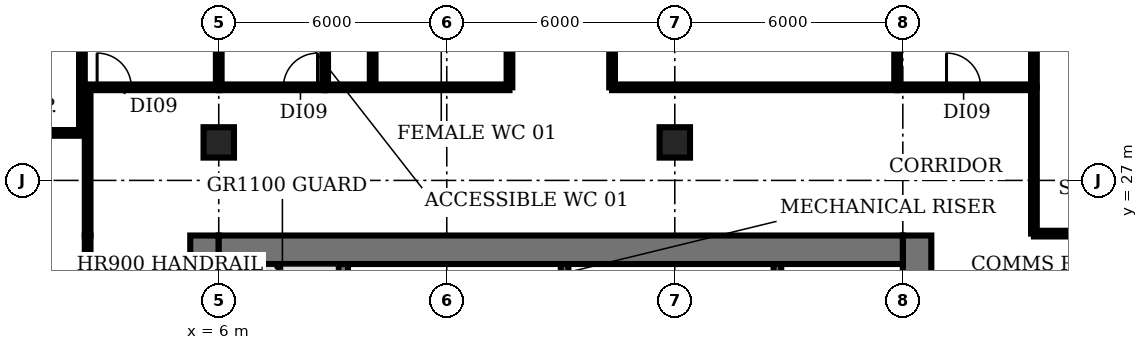
"""IFC4 building model, lengths in metres.
Left out: names, types, materials, properties, quantities, classifications, styles, units other than length and angle.
Written with IfcOpenShell. Run it as: python <this file> out.ifc"""

import sys

from ifc_helpers import new_model, si_unit, direction, frame, frame_2d, origin, origin_2d, place, context, subcontext, project, spatial, rectangle, extrude, element, fill, save


model = new_model("IFC4")
c1 = context("Model", 3, precision=1e-05, world=origin(), true_north=direction((0.0, 1.0)))
c2 = subcontext(c1, "Body", "Model", "MODEL_VIEW")
j1 = project(units=[si_unit("LENGTHUNIT", "METRE"), si_unit("PLANEANGLEUNIT", "RADIAN")], contexts=[c1])
p1 = place(None, origin())
s1 = spatial("IfcSite", under=j1, at=p1, CompositionType="ELEMENT")
p2 = place(p1, origin())
s2 = spatial("IfcBuilding", under=s1, at=p2, CompositionType="ELEMENT")
p3 = place(p2, frame((0.0, 0.0, 129.8)))
s3 = spatial("IfcBuildingStorey", under=s2, at=p3, CompositionType="ELEMENT", Elevation=129.8)
for number, where, z_axis, x_axis in (
    (1, (6.0, 28.0, 0.0), (0.0, 0.0, 1.0), (1.0, 0.0, 0.0)),
    (2, (18.0, 28.0, 0.0), (0.0, 0.0, 1.0), (1.0, 0.0, 0.0)),
):
    element("IfcColumn", number, at=place(p3, frame(where, z_axis=z_axis, x_axis=x_axis)), inside=s3, PredefinedType="COLUMN", context=c2, shape_type="SweptSolid", body=[
        extrude(rectangle(XDim=0.8, YDim=0.8, at=origin_2d()), origin(), (0.0, 0.0, 1.0), 3.85),
    ])
p4 = place(p3, frame((9.275, 18.375, 0.0), z_axis=(0.0, 0.0, 1.0), x_axis=(0.0, 1.0, 0.0)))
e3 = element("IfcWall", 3, at=p4, inside=s3, PredefinedType="SHEAR", context=c2, shape_type="SweptSolid", body=[
    extrude(rectangle(XDim=6.425, YDim=0.25, at=frame_2d((3.212, 0.0))), origin(), (0.0, 0.0, 1.0), 3.85),
])
for number, where, z_axis, x_axis in (
    (4, (15.1, 22.9, 0.0), (0.0, 0.0, 1.0), (0.0, 1.0, 0.0)),
    (5, (20.7, 22.9, 0.0), (0.0, 0.0, 1.0), (0.0, 1.0, 0.0)),
):
    element("IfcWall", number, at=place(p3, frame(where, z_axis=z_axis, x_axis=x_axis)), inside=s3, PredefinedType="SHEAR", context=c2, shape_type="SweptSolid", body=[
        extrude(rectangle(XDim=1.9, YDim=0.2, at=frame_2d((0.95, 0.0))), origin(), (0.0, 0.0, 1.0), 3.85),
    ])
p5 = place(p3, frame((5.625, 4.47, 0.0), z_axis=(0.0, 0.0, 1.0), x_axis=(0.0, 1.0, 0.0)))
e6 = element("IfcWall", 6, at=p5, inside=s3, PredefinedType="SHEAR", context=c2, shape_type="SweptSolid", body=[
    extrude(rectangle(XDim=21.08, YDim=0.75, at=frame_2d((10.54, 0.0))), origin(), (0.0, 0.0, 1.0), 3.85),
])
p6 = place(p5, frame((1.18, 0.0, 0.0)))
e7 = element("IfcOpeningElement", 7, at=p6, cuts=e6, PredefinedType="OPENING", context=c2, shape_type="SweptSolid", body=[
    extrude(rectangle(XDim=1.5, YDim=2.1, at=frame_2d((0.75, 1.05))), frame((0.0, 0.385, 0.0), z_axis=(0.0, -1.0, 0.0), x_axis=(1.0, 0.0, 0.0)), (0.0, 0.0, 1.0), 0.77),
])
p7 = place(p5, frame((7.63, 0.0, 0.0)))
e8 = element("IfcOpeningElement", 8, at=p7, cuts=e6, PredefinedType="OPENING", context=c2, shape_type="SweptSolid", body=[
    extrude(rectangle(XDim=1.2, YDim=2.1, at=frame_2d((0.6, 1.05))), frame((0.0, 0.385, 0.0), z_axis=(0.0, -1.0, 0.0), x_axis=(1.0, 0.0, 0.0)), (0.0, 0.0, 1.0), 0.77),
])
p8 = place(p5, frame((14.18, 0.0, 0.0)))
e9 = element("IfcOpeningElement", 9, at=p8, cuts=e6, PredefinedType="OPENING", context=c2, shape_type="SweptSolid", body=[
    extrude(rectangle(XDim=1.2, YDim=2.1, at=frame_2d((0.6, 1.05))), frame((0.0, 0.385, 0.0), z_axis=(0.0, -1.0, 0.0), x_axis=(1.0, 0.0, 0.0)), (0.0, 0.0, 1.0), 0.77),
])
p9 = place(p3, frame((24.375, 25.55, 0.0), z_axis=(0.0, 0.0, 1.0), x_axis=(0.0, -1.0, 0.0)))
e10 = element("IfcWall", 10, at=p9, inside=s3, PredefinedType="SHEAR", context=c2, shape_type="SweptSolid", body=[
    extrude(rectangle(XDim=21.13, YDim=0.75, at=frame_2d((10.565, 0.0))), origin(), (0.0, 0.0, 1.0), 3.85),
])
p10 = place(p9, frame((18.4, 0.0, 0.0)))
e11 = element("IfcOpeningElement", 11, at=p10, cuts=e10, PredefinedType="OPENING", context=c2, shape_type="SweptSolid", body=[
    extrude(rectangle(XDim=1.5, YDim=2.1, at=frame_2d((0.75, 1.05))), frame((0.0, 0.385, 0.0), z_axis=(0.0, -1.0, 0.0), x_axis=(1.0, 0.0, 0.0)), (0.0, 0.0, 1.0), 0.77),
])
p11 = place(p9, frame((12.3, 0.0, 0.0)))
e12 = element("IfcOpeningElement", 12, at=p11, cuts=e10, PredefinedType="OPENING", context=c2, shape_type="SweptSolid", body=[
    extrude(rectangle(XDim=0.9, YDim=2.1, at=frame_2d((0.45, 1.05))), frame((0.0, 0.385, 0.0), z_axis=(0.0, -1.0, 0.0), x_axis=(1.0, 0.0, 0.0)), (0.0, 0.0, 1.0), 0.77),
])
p12 = place(p9, frame((6.3, 0.0, 0.0)))
e13 = element("IfcOpeningElement", 13, at=p12, cuts=e10, PredefinedType="OPENING", context=c2, shape_type="SweptSolid", body=[
    extrude(rectangle(XDim=2.0, YDim=2.1, at=frame_2d((1.0, 1.05))), frame((0.0, 0.385, 0.0), z_axis=(0.0, -1.0, 0.0), x_axis=(1.0, 0.0, 0.0)), (0.0, 0.0, 1.0), 0.77),
])
p13 = place(p3, frame((6.0, 25.175, 0.0), z_axis=(0.0, 0.0, 1.0), x_axis=(1.0, 0.0, 0.0)))
e14 = element("IfcWall", 14, at=p13, inside=s3, PredefinedType="SHEAR", context=c2, shape_type="SweptSolid", body=[
    extrude(rectangle(XDim=18.0, YDim=0.75, at=frame_2d((9.0, 0.0))), origin(), (0.0, 0.0, 1.0), 3.85),
])
p14 = place(p3, frame((-1.44, 28.25, 0.0), z_axis=(0.0, 0.0, 1.0), x_axis=(1.0, 0.0, 0.0)))
e15 = element("IfcWall", 15, at=p14, inside=s3, PredefinedType="PARTITIONING", context=c2, shape_type="SweptSolid", body=[
    extrude(rectangle(XDim=3.84, YDim=0.15, at=frame_2d((1.92, 0.0))), origin(), (0.0, 0.0, 1.0), 2.83),
])
p15 = place(p3, frame((2.4, 28.25, 0.0), z_axis=(0.0, 0.0, 1.0), x_axis=(0.0, 1.0, 0.0)))
e16 = element("IfcWall", 16, at=p15, inside=s3, PredefinedType="PARTITIONING", context=c2, shape_type="SweptSolid", body=[
    extrude(rectangle(XDim=6.0, YDim=0.15, at=frame_2d((3.0, 0.0))), origin(), (0.0, 0.0, 1.0), 2.83),
])
p16 = place(p3, frame((2.55, 6.1, 0.0), z_axis=(0.0, 0.0, 1.0), x_axis=(0.0, 1.0, 0.0)))
e17 = element("IfcWall", 17, at=p16, inside=s3, PredefinedType="PARTITIONING", context=c2, shape_type="SweptSolid", body=[
    extrude(rectangle(XDim=19.45, YDim=0.15, at=frame_2d((9.725, 0.0))), origin(), (0.0, 0.0, 1.0), 2.83),
])
p17 = place(p16, frame((7.55, 0.0, 0.0)))
e18 = element("IfcOpeningElement", 18, at=p17, cuts=e17, PredefinedType="OPENING", context=c2, shape_type="SweptSolid", body=[
    extrude(rectangle(XDim=1.2, YDim=2.1, at=frame_2d((0.6, 1.05))), frame((0.0, 0.085, 0.0), z_axis=(0.0, -1.0, 0.0), x_axis=(1.0, 0.0, 0.0)), (0.0, 0.0, 1.0), 0.17),
])
p18 = place(p3, frame((2.55, 25.55, 0.0), z_axis=(0.0, 0.0, 1.0), x_axis=(0.0, 1.0, 0.0)))
e19 = element("IfcWall", 19, at=p18, inside=s3, PredefinedType="PARTITIONING", context=c2, shape_type="SweptSolid", body=[
    extrude(rectangle(XDim=3.9, YDim=0.15, at=frame_2d((1.95, 0.0))), origin(), (0.0, 0.0, 1.0), 2.83),
])
p19 = place(p3, frame((2.55, 29.45, 0.0), z_axis=(0.0, 0.0, 1.0), x_axis=(1.0, 0.0, 0.0)))
e20 = element("IfcWall", 20, at=p19, inside=s3, PredefinedType="PARTITIONING", context=c2, shape_type="SweptSolid", body=[
    extrude(rectangle(XDim=3.45, YDim=0.15, at=frame_2d((1.725, 0.0))), origin(), (0.0, 0.0, 1.0), 2.83),
])
p20 = place(p19, frame((0.25, 0.0, 0.0)))
e21 = element("IfcOpeningElement", 21, at=p20, cuts=e20, PredefinedType="OPENING", context=c2, shape_type="SweptSolid", body=[
    extrude(rectangle(XDim=0.9, YDim=2.1, at=frame_2d((0.45, 1.05))), frame((0.0, 0.085, 0.0), z_axis=(0.0, -1.0, 0.0), x_axis=(1.0, 0.0, 0.0)), (0.0, 0.0, 1.0), 0.17),
])
p21 = place(p3, frame((6.0, 29.45, 0.0), z_axis=(0.0, 0.0, 1.0), x_axis=(0.0, 1.0, 0.0)))
e22 = element("IfcWall", 22, at=p21, inside=s3, PredefinedType="PARTITIONING", context=c2, shape_type="SweptSolid", body=[
    extrude(rectangle(XDim=4.8, YDim=0.15, at=frame_2d((2.4, 0.0))), origin(), (0.0, 0.0, 1.0), 2.83),
])
p22 = place(p3, frame((6.0, 29.45, 0.0), z_axis=(0.0, 0.0, 1.0), x_axis=(1.0, 0.0, 0.0)))
e23 = element("IfcWall", 23, at=p22, inside=s3, PredefinedType="PARTITIONING", context=c2, shape_type="SweptSolid", body=[
    extrude(rectangle(XDim=2.8, YDim=0.15, at=frame_2d((1.4, 0.0))), origin(), (0.0, 0.0, 1.0), 2.83),
])
p23 = place(p22, frame((1.7, 0.0, 0.0)))
e24 = element("IfcOpeningElement", 24, at=p23, cuts=e23, PredefinedType="OPENING", context=c2, shape_type="SweptSolid", body=[
    extrude(rectangle(XDim=0.9, YDim=2.1, at=frame_2d((0.45, 1.05))), frame((0.0, 0.085, 0.0), z_axis=(0.0, -1.0, 0.0), x_axis=(1.0, 0.0, 0.0)), (0.0, 0.0, 1.0), 0.17),
])
p24 = place(p3, frame((8.8, 29.45, 0.0), z_axis=(0.0, 0.0, 1.0), x_axis=(0.0, 1.0, 0.0)))
e25 = element("IfcWall", 25, at=p24, inside=s3, PredefinedType="PARTITIONING", context=c2, shape_type="SweptSolid", body=[
    extrude(rectangle(XDim=4.8, YDim=0.15, at=frame_2d((2.4, 0.0))), origin(), (0.0, 0.0, 1.0), 2.83),
])
p25 = place(p3, frame((8.8, 29.45, 0.0), z_axis=(0.0, 0.0, 1.0), x_axis=(1.0, 0.0, 0.0)))
e26 = element("IfcWall", 26, at=p25, inside=s3, PredefinedType="PARTITIONING", context=c2, shape_type="SweptSolid", body=[
    extrude(rectangle(XDim=4.85, YDim=0.15, at=frame_2d((2.425, 0.0))), origin(), (0.0, 0.0, 1.0), 2.83),
])
p26 = place(p3, frame((10.05, 29.45, 0.0), z_axis=(0.0, 0.0, 1.0), x_axis=(0.0, 1.0, 0.0)))
e27 = element("IfcWall", 27, at=p26, inside=s3, PredefinedType="PARTITIONING", context=c2, shape_type="SweptSolid", body=[
    extrude(rectangle(XDim=4.8, YDim=0.15, at=frame_2d((2.4, 0.0))), origin(), (0.0, 0.0, 1.0), 2.83),
])
p27 = place(p3, frame((13.65, 29.45, 0.0), z_axis=(0.0, 0.0, 1.0), x_axis=(0.0, 1.0, 0.0)))
e28 = element("IfcWall", 28, at=p27, inside=s3, PredefinedType="PARTITIONING", context=c2, shape_type="SweptSolid", body=[
    extrude(rectangle(XDim=4.8, YDim=0.15, at=frame_2d((2.4, 0.0))), origin(), (0.0, 0.0, 1.0), 2.83),
])
p28 = place(p27, frame((1.9, 0.0, 0.0)))
e29 = element("IfcOpeningElement", 29, at=p28, cuts=e28, PredefinedType="OPENING", context=c2, shape_type="SweptSolid", body=[
    extrude(rectangle(XDim=0.9, YDim=2.1, at=frame_2d((0.45, 1.05))), frame((0.0, 0.085, 0.0), z_axis=(0.0, -1.0, 0.0), x_axis=(1.0, 0.0, 0.0)), (0.0, 0.0, 1.0), 0.17),
])
p29 = place(p3, frame((16.35, 29.45, 0.0), z_axis=(0.0, 0.0, 1.0), x_axis=(0.0, 1.0, 0.0)))
e30 = element("IfcWall", 30, at=p29, inside=s3, PredefinedType="PARTITIONING", context=c2, shape_type="SweptSolid", body=[
    extrude(rectangle(XDim=4.8, YDim=0.15, at=frame_2d((2.4, 0.0))), origin(), (0.0, 0.0, 1.0), 2.83),
])
p30 = place(p3, frame((16.35, 29.45, 0.0), z_axis=(0.0, 0.0, 1.0), x_axis=(1.0, 0.0, 0.0)))
e31 = element("IfcWall", 31, at=p30, inside=s3, PredefinedType="PARTITIONING", context=c2, shape_type="SweptSolid", body=[
    extrude(rectangle(XDim=7.5, YDim=0.15, at=frame_2d((3.75, 0.0))), origin(), (0.0, 0.0, 1.0), 2.83),
])
p31 = place(p3, frame((23.85, 29.45, 0.0), z_axis=(0.0, 0.0, 1.0), x_axis=(0.0, 1.0, 0.0)))
e32 = element("IfcWall", 32, at=p31, inside=s3, PredefinedType="PARTITIONING", context=c2, shape_type="SweptSolid", body=[
    extrude(rectangle(XDim=4.8, YDim=0.15, at=frame_2d((2.4, 0.0))), origin(), (0.0, 0.0, 1.0), 2.83),
])
p32 = place(p3, frame((23.85, 29.45, 0.0), z_axis=(0.0, 0.0, 1.0), x_axis=(1.0, 0.0, 0.0)))
e33 = element("IfcWall", 33, at=p32, inside=s3, PredefinedType="PARTITIONING", context=c2, shape_type="SweptSolid", body=[
    extrude(rectangle(XDim=3.6, YDim=0.15, at=frame_2d((1.8, 0.0))), origin(), (0.0, 0.0, 1.0), 2.83),
])
p33 = place(p32, frame((1.3, 0.0, 0.0)))
e34 = element("IfcOpeningElement", 34, at=p33, cuts=e33, PredefinedType="OPENING", context=c2, shape_type="SweptSolid", body=[
    extrude(rectangle(XDim=0.9, YDim=2.1, at=frame_2d((0.45, 1.05))), frame((0.0, 0.085, 0.0), z_axis=(0.0, -1.0, 0.0), x_axis=(1.0, 0.0, 0.0)), (0.0, 0.0, 1.0), 0.17),
])
p34 = place(p3, frame((27.45, 25.6, 0.0), z_axis=(0.0, 0.0, 1.0), x_axis=(0.0, 1.0, 0.0)))
e35 = element("IfcWall", 35, at=p34, inside=s3, PredefinedType="PARTITIONING", context=c2, shape_type="SweptSolid", body=[
    extrude(rectangle(XDim=3.85, YDim=0.15, at=frame_2d((1.925, 0.0))), origin(), (0.0, 0.0, 1.0), 2.83),
])
p35 = place(p3, frame((27.45, 25.6, 0.0), z_axis=(0.0, 0.0, 1.0), x_axis=(1.0, 0.0, 0.0)))
e36 = element("IfcWall", 36, at=p35, inside=s3, PredefinedType="PARTITIONING", context=c2, shape_type="SweptSolid", body=[
    extrude(rectangle(XDim=8.55, YDim=0.15, at=frame_2d((4.275, 0.0))), origin(), (0.0, 0.0, 1.0), 2.83),
])
p36 = place(p35, frame((4.05, 0.0, 0.0)))
e37 = element("IfcOpeningElement", 37, at=p36, cuts=e36, PredefinedType="OPENING", context=c2, shape_type="SweptSolid", body=[
    extrude(rectangle(XDim=1.0, YDim=2.1, at=frame_2d((0.5, 1.05))), frame((0.0, 0.085, 0.0), z_axis=(0.0, -1.0, 0.0), x_axis=(1.0, 0.0, 0.0)), (0.0, 0.0, 1.0), 0.17),
])
p37 = place(p3, frame((27.45, 29.45, 0.0), z_axis=(0.0, 0.0, 1.0), x_axis=(0.0, 1.0, 0.0)))
e38 = element("IfcWall", 38, at=p37, inside=s3, PredefinedType="PARTITIONING", context=c2, shape_type="SweptSolid", body=[
    extrude(rectangle(XDim=2.49, YDim=0.15, at=frame_2d((1.245, 0.0))), origin(), (0.0, 0.0, 1.0), 2.83),
])
p38 = place(p20, origin())
e39 = element("IfcDoor", 39, at=p38, inside=s3, OperationType="SINGLE_SWING_LEFT", PredefinedType="DOOR", context=c2, shape_type="SweptSolid", body=[
    extrude(rectangle(XDim=0.9, YDim=2.1, at=frame_2d((0.45, 1.05))), frame((0.0, 0.025, 0.0), z_axis=(0.0, -1.0, 0.0), x_axis=(1.0, 0.0, 0.0)), (0.0, 0.0, 1.0), 0.05),
])
fill(e21, e39)
p39 = place(p23, origin())
e40 = element("IfcDoor", 40, at=p39, inside=s3, OperationType="SINGLE_SWING_RIGHT", PredefinedType="DOOR", context=c2, shape_type="SweptSolid", body=[
    extrude(rectangle(XDim=0.9, YDim=2.1, at=frame_2d((0.45, 1.05))), frame((0.0, 0.025, 0.0), z_axis=(0.0, -1.0, 0.0), x_axis=(1.0, 0.0, 0.0)), (0.0, 0.0, 1.0), 0.05),
])
fill(e24, e40)
p40 = place(p33, origin())
e41 = element("IfcDoor", 41, at=p40, inside=s3, OperationType="SINGLE_SWING_LEFT", PredefinedType="DOOR", context=c2, shape_type="SweptSolid", body=[
    extrude(rectangle(XDim=0.9, YDim=2.1, at=frame_2d((0.45, 1.05))), frame((0.0, 0.025, 0.0), z_axis=(0.0, -1.0, 0.0), x_axis=(1.0, 0.0, 0.0)), (0.0, 0.0, 1.0), 0.05),
])
fill(e34, e41)
save(model, sys.argv[1])
